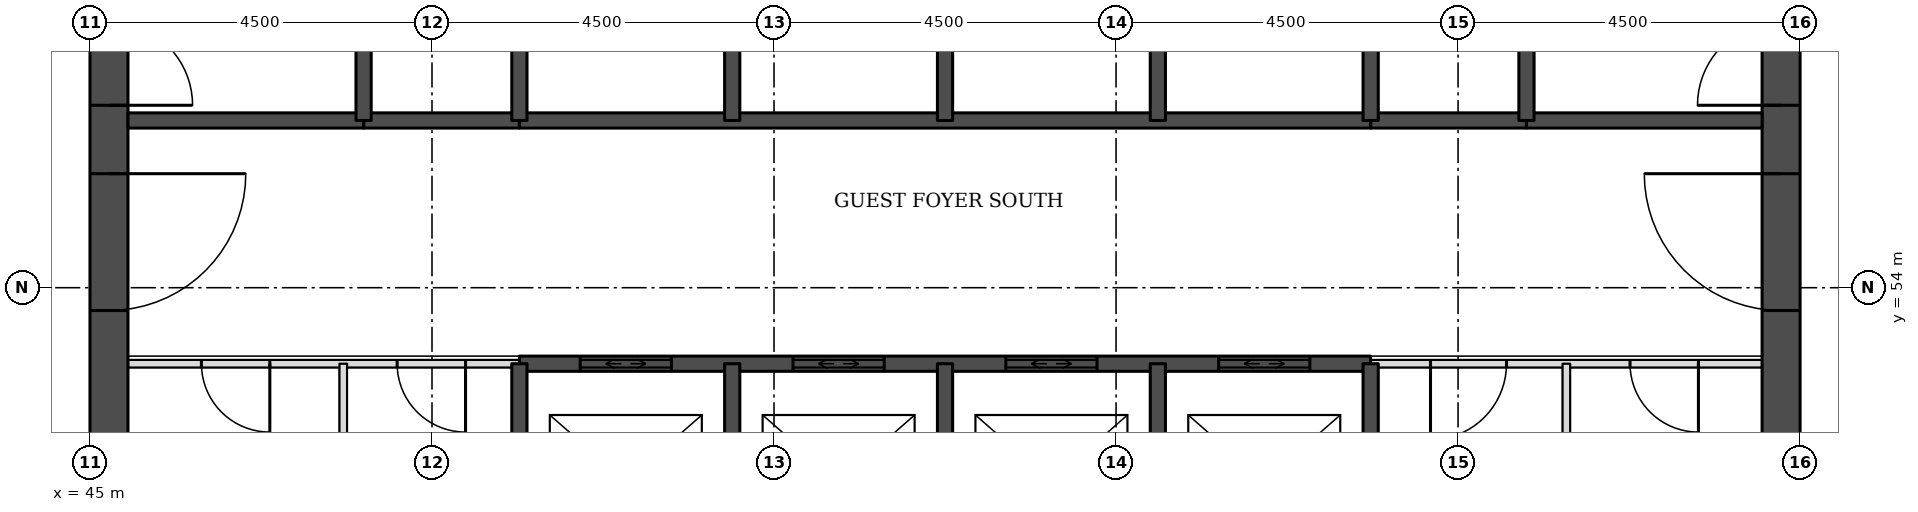
"""IFC4 building model, lengths in metres.
Left out: names, types, materials, properties, quantities, classifications, styles, units other than length and angle.
Written with IfcOpenShell. Run it as: python <this file> out.ifc"""

import sys

from ifc_helpers import new_model, si_unit, direction, frame, frame_2d, origin, place, context, subcontext, project, spatial, rectangle, extrude, element, fill, save


model = new_model("IFC4")
c1 = context("Model", 3, precision=1e-05, world=origin(), true_north=direction((0.0, 1.0)))
c2 = subcontext(c1, "Body", "Model", "MODEL_VIEW")
j1 = project(units=[si_unit("LENGTHUNIT", "METRE"), si_unit("PLANEANGLEUNIT", "RADIAN")], contexts=[c1])
p1 = place(None, origin())
s1 = spatial("IfcSite", under=j1, at=p1, CompositionType="ELEMENT")
p2 = place(p1, origin())
s2 = spatial("IfcBuilding", under=s1, at=p2, CompositionType="ELEMENT")
p3 = place(p2, frame((0.0, 0.0, 46.2)))
s3 = spatial("IfcBuildingStorey", under=s2, at=p3, CompositionType="ELEMENT", Elevation=46.2)
p4 = place(p3, frame((45.25, 49.5, 0.0), z_axis=(0.0, 0.0, 1.0), x_axis=(0.0, 1.0, 0.0)))
e1 = element("IfcWall", 1, at=p4, inside=s3, PredefinedType="SHEAR", context=c2, shape_type="SweptSolid", body=[
    extrude(rectangle(XDim=22.5, YDim=0.5, at=frame_2d((11.25, 0.0))), origin(), (0.0, 0.0, 1.0), 3.3),
])
p5 = place(p4, frame((4.2, 0.0, 0.0)))
e2 = element("IfcOpeningElement", 2, at=p5, cuts=e1, PredefinedType="OPENING", context=c2, shape_type="SweptSolid", body=[
    extrude(rectangle(XDim=1.8, YDim=2.1, at=frame_2d((0.9, 1.05))), frame((0.0, 0.26, 0.0), z_axis=(0.0, -1.0, 0.0), x_axis=(1.0, 0.0, 0.0)), (0.0, 0.0, 1.0), 0.52),
])
p6 = place(p4, frame((6.9, 0.0, 0.0)))
e3 = element("IfcOpeningElement", 3, at=p6, cuts=e1, PredefinedType="OPENING", context=c2, shape_type="SweptSolid", body=[
    extrude(rectangle(XDim=1.1, YDim=2.1, at=frame_2d((0.55, 1.05))), frame((0.0, 0.26, 0.0), z_axis=(0.0, -1.0, 0.0), x_axis=(1.0, 0.0, 0.0)), (0.0, 0.0, 1.0), 0.52),
])
p7 = place(p4, frame((13.6, 0.0, 0.0)))
e4 = element("IfcOpeningElement", 4, at=p7, cuts=e1, PredefinedType="OPENING", context=c2, shape_type="SweptSolid", body=[
    extrude(rectangle(XDim=1.1, YDim=2.1, at=frame_2d((0.55, 1.05))), frame((0.0, 0.26, 0.0), z_axis=(0.0, -1.0, 0.0), x_axis=(1.0, 0.0, 0.0)), (0.0, 0.0, 1.0), 0.52),
])
p8 = place(p4, frame((16.5, 0.0, 0.0)))
e5 = element("IfcOpeningElement", 5, at=p8, cuts=e1, PredefinedType="OPENING", context=c2, shape_type="SweptSolid", body=[
    extrude(rectangle(XDim=1.8, YDim=2.1, at=frame_2d((0.9, 1.05))), frame((0.0, 0.26, 0.0), z_axis=(0.0, -1.0, 0.0), x_axis=(1.0, 0.0, 0.0)), (0.0, 0.0, 1.0), 0.52),
])
p9 = place(p3, frame((67.25, 49.5, 0.0), z_axis=(0.0, 0.0, 1.0), x_axis=(0.0, 1.0, 0.0)))
e6 = element("IfcWall", 6, at=p9, inside=s3, PredefinedType="SHEAR", context=c2, shape_type="SweptSolid", body=[
    extrude(rectangle(XDim=22.5, YDim=0.5, at=frame_2d((11.25, 0.0))), origin(), (0.0, 0.0, 1.0), 3.3),
])
p10 = place(p9, frame((4.2, 0.0, 0.0)))
e7 = element("IfcOpeningElement", 7, at=p10, cuts=e6, PredefinedType="OPENING", context=c2, shape_type="SweptSolid", body=[
    extrude(rectangle(XDim=1.8, YDim=2.1, at=frame_2d((0.9, 1.05))), frame((0.0, 0.26, 0.0), z_axis=(0.0, -1.0, 0.0), x_axis=(1.0, 0.0, 0.0)), (0.0, 0.0, 1.0), 0.52),
])
p11 = place(p9, frame((6.9, 0.0, 0.0)))
e8 = element("IfcOpeningElement", 8, at=p11, cuts=e6, PredefinedType="OPENING", context=c2, shape_type="SweptSolid", body=[
    extrude(rectangle(XDim=1.1, YDim=2.1, at=frame_2d((0.55, 1.05))), frame((0.0, 0.26, 0.0), z_axis=(0.0, -1.0, 0.0), x_axis=(1.0, 0.0, 0.0)), (0.0, 0.0, 1.0), 0.52),
])
p12 = place(p9, frame((13.6, 0.0, 0.0)))
e9 = element("IfcOpeningElement", 9, at=p12, cuts=e6, PredefinedType="OPENING", context=c2, shape_type="SweptSolid", body=[
    extrude(rectangle(XDim=1.1, YDim=2.1, at=frame_2d((0.55, 1.05))), frame((0.0, 0.26, 0.0), z_axis=(0.0, -1.0, 0.0), x_axis=(1.0, 0.0, 0.0)), (0.0, 0.0, 1.0), 0.52),
])
p13 = place(p9, frame((16.5, 0.0, 0.0)))
e10 = element("IfcOpeningElement", 10, at=p13, cuts=e6, PredefinedType="OPENING", context=c2, shape_type="SweptSolid", body=[
    extrude(rectangle(XDim=1.8, YDim=2.1, at=frame_2d((0.9, 1.05))), frame((0.0, 0.26, 0.0), z_axis=(0.0, -1.0, 0.0), x_axis=(1.0, 0.0, 0.0)), (0.0, 0.0, 1.0), 0.52),
])
p14 = place(p3, frame((45.5, 53.0, 0.0), z_axis=(0.0, 0.0, 1.0), x_axis=(1.0, 0.0, 0.0)))
e11 = element("IfcWall", 11, at=p14, inside=s3, PredefinedType="PARTITIONING", context=c2, shape_type="SweptSolid", body=[
    extrude(rectangle(XDim=5.15, YDim=0.1, at=frame_2d((2.575, 0.0))), origin(), (0.0, 0.0, 1.0), 3.08),
])
p15 = place(p14, frame((0.966, 0.0, 0.0)))
e12 = element("IfcOpeningElement", 12, at=p15, cuts=e11, PredefinedType="OPENING", context=c2, shape_type="SweptSolid", body=[
    extrude(rectangle(XDim=0.9, YDim=2.1, at=frame_2d((0.45, 1.05))), frame((0.0, 0.06, 0.0), z_axis=(0.0, -1.0, 0.0), x_axis=(1.0, 0.0, 0.0)), (0.0, 0.0, 1.0), 0.12),
])
p16 = place(p14, frame((3.541, 0.0, 0.0)))
e13 = element("IfcOpeningElement", 13, at=p16, cuts=e11, PredefinedType="OPENING", context=c2, shape_type="SweptSolid", body=[
    extrude(rectangle(XDim=0.9, YDim=2.1, at=frame_2d((0.45, 1.05))), frame((0.0, 0.06, 0.0), z_axis=(0.0, -1.0, 0.0), x_axis=(1.0, 0.0, 0.0)), (0.0, 0.0, 1.0), 0.12),
])
p17 = place(p3, frame((61.85, 53.0, 0.0), z_axis=(0.0, 0.0, 1.0), x_axis=(1.0, 0.0, 0.0)))
e14 = element("IfcWall", 14, at=p17, inside=s3, PredefinedType="PARTITIONING", context=c2, shape_type="SweptSolid", body=[
    extrude(rectangle(XDim=5.15, YDim=0.1, at=frame_2d((2.575, 0.0))), origin(), (0.0, 0.0, 1.0), 3.08),
])
p18 = place(p17, frame((3.413, 0.0, 0.0)))
e15 = element("IfcOpeningElement", 15, at=p18, cuts=e14, PredefinedType="OPENING", context=c2, shape_type="SweptSolid", body=[
    extrude(rectangle(XDim=0.9, YDim=2.1, at=frame_2d((0.45, 1.05))), frame((0.0, 0.06, 0.0), z_axis=(0.0, -1.0, 0.0), x_axis=(1.0, 0.0, 0.0)), (0.0, 0.0, 1.0), 0.12),
])
p19 = place(p17, frame((0.788, 0.0, 0.0)))
e16 = element("IfcOpeningElement", 16, at=p19, cuts=e14, PredefinedType="OPENING", context=c2, shape_type="SweptSolid", body=[
    extrude(rectangle(XDim=1.0, YDim=2.1, at=frame_2d((0.5, 1.05))), frame((0.0, 0.06, 0.0), z_axis=(0.0, -1.0, 0.0), x_axis=(1.0, 0.0, 0.0)), (0.0, 0.0, 1.0), 0.12),
])
p20 = place(p3, frame((50.65, 53.0, 0.0), z_axis=(0.0, 0.0, 1.0), x_axis=(1.0, 0.0, 0.0)))
e17 = element("IfcWall", 17, at=p20, inside=s3, PredefinedType="SOLIDWALL", context=c2, shape_type="SweptSolid", body=[
    extrude(rectangle(XDim=11.2, YDim=0.2, at=frame_2d((5.6, 0.0))), origin(), (0.0, 0.0, 1.0), 3.08),
])
p21 = place(p20, frame((0.8, 0.0, 0.0)))
e18 = element("IfcOpeningElement", 18, at=p21, cuts=e17, PredefinedType="OPENING", context=c2, shape_type="SweptSolid", body=[
    extrude(rectangle(XDim=1.2, YDim=2.1, at=frame_2d((0.6, 1.05))), frame((0.0, 0.11, 0.0), z_axis=(0.0, -1.0, 0.0), x_axis=(1.0, 0.0, 0.0)), (0.0, 0.0, 1.0), 0.22),
])
p22 = place(p20, frame((3.6, 0.0, 0.0)))
e19 = element("IfcOpeningElement", 19, at=p22, cuts=e17, PredefinedType="OPENING", context=c2, shape_type="SweptSolid", body=[
    extrude(rectangle(XDim=1.2, YDim=2.1, at=frame_2d((0.6, 1.05))), frame((0.0, 0.11, 0.0), z_axis=(0.0, -1.0, 0.0), x_axis=(1.0, 0.0, 0.0)), (0.0, 0.0, 1.0), 0.22),
])
p23 = place(p20, frame((6.4, 0.0, 0.0)))
e20 = element("IfcOpeningElement", 20, at=p23, cuts=e17, PredefinedType="OPENING", context=c2, shape_type="SweptSolid", body=[
    extrude(rectangle(XDim=1.2, YDim=2.1, at=frame_2d((0.6, 1.05))), frame((0.0, 0.11, 0.0), z_axis=(0.0, -1.0, 0.0), x_axis=(1.0, 0.0, 0.0)), (0.0, 0.0, 1.0), 0.22),
])
p24 = place(p20, frame((9.2, 0.0, 0.0)))
e21 = element("IfcOpeningElement", 21, at=p24, cuts=e17, PredefinedType="OPENING", context=c2, shape_type="SweptSolid", body=[
    extrude(rectangle(XDim=1.2, YDim=2.1, at=frame_2d((0.6, 1.05))), frame((0.0, 0.11, 0.0), z_axis=(0.0, -1.0, 0.0), x_axis=(1.0, 0.0, 0.0)), (0.0, 0.0, 1.0), 0.22),
])
for number, where, z_axis, x_axis in (
    (22, (48.6, 56.2, 0.0), (0.0, 0.0, 1.0), (1.0, 0.0, 0.0)),
    (23, (61.85, 56.2, 0.0), (0.0, 0.0, 1.0), (1.0, 0.0, 0.0)),
):
    element("IfcWall", number, at=place(p3, frame(where, z_axis=z_axis, x_axis=x_axis)), inside=s3, PredefinedType="SOLIDWALL", context=c2, shape_type="SweptSolid", body=[
        extrude(rectangle(XDim=2.05, YDim=0.2, at=frame_2d((1.025, 0.0))), origin(), (0.0, 0.0, 1.0), 3.08),
    ])
p25 = place(p3, frame((45.5, 56.2, 0.0), z_axis=(0.0, 0.0, 1.0), x_axis=(1.0, 0.0, 0.0)))
e24 = element("IfcWall", 24, at=p25, inside=s3, PredefinedType="SOLIDWALL", context=c2, shape_type="SweptSolid", body=[
    extrude(rectangle(XDim=3.1, YDim=0.2, at=frame_2d((1.55, 0.0))), origin(), (0.0, 0.0, 1.0), 3.08),
])
p26 = place(p3, frame((50.65, 56.2, 0.0), z_axis=(0.0, 0.0, 1.0), x_axis=(1.0, 0.0, 0.0)))
e25 = element("IfcWall", 25, at=p26, inside=s3, PredefinedType="SOLIDWALL", context=c2, shape_type="SweptSolid", body=[
    extrude(rectangle(XDim=11.2, YDim=0.2, at=frame_2d((5.6, 0.0))), origin(), (0.0, 0.0, 1.0), 3.08),
])
p27 = place(p3, frame((63.9, 56.2, 0.0), z_axis=(0.0, 0.0, 1.0), x_axis=(1.0, 0.0, 0.0)))
e26 = element("IfcWall", 26, at=p27, inside=s3, PredefinedType="SOLIDWALL", context=c2, shape_type="SweptSolid", body=[
    extrude(rectangle(XDim=3.1, YDim=0.2, at=frame_2d((1.55, 0.0))), origin(), (0.0, 0.0, 1.0), 3.08),
])
p28 = place(p3, frame((48.333, 50.0, 0.0), z_axis=(0.0, 0.0, 1.0), x_axis=(0.0, 1.0, 0.0)))
e27 = element("IfcWall", 27, at=p28, inside=s3, PredefinedType="PARTITIONING", context=c2, shape_type="SweptSolid", body=[
    extrude(rectangle(XDim=3.0, YDim=0.1, at=frame_2d((1.5, 0.0))), origin(), (0.0, 0.0, 1.0), 3.08),
])
p29 = place(p3, frame((48.6, 56.2, 0.0), z_axis=(0.0, 0.0, 1.0), x_axis=(0.0, 1.0, 0.0)))
e28 = element("IfcWall", 28, at=p29, inside=s3, PredefinedType="SOLIDWALL", context=c2, shape_type="SweptSolid", body=[
    extrude(rectangle(XDim=5.8, YDim=0.2, at=frame_2d((2.9, 0.0))), origin(), (0.0, 0.0, 1.0), 3.08),
])
p30 = place(p3, frame((50.65, 50.0, 0.0), z_axis=(0.0, 0.0, 1.0), x_axis=(0.0, 1.0, 0.0)))
e29 = element("IfcWall", 29, at=p30, inside=s3, PredefinedType="SOLIDWALL", context=c2, shape_type="SweptSolid", body=[
    extrude(rectangle(XDim=3.0, YDim=0.2, at=frame_2d((1.5, 0.0))), origin(), (0.0, 0.0, 1.0), 3.08),
])
p31 = place(p3, frame((50.65, 56.2, 0.0), z_axis=(0.0, 0.0, 1.0), x_axis=(0.0, 1.0, 0.0)))
e30 = element("IfcWall", 30, at=p31, inside=s3, PredefinedType="SOLIDWALL", context=c2, shape_type="SweptSolid", body=[
    extrude(rectangle(XDim=2.8, YDim=0.2, at=frame_2d((1.4, 0.0))), origin(), (0.0, 0.0, 1.0), 3.08),
])
p32 = place(p3, frame((53.45, 50.0, 0.0), z_axis=(0.0, 0.0, 1.0), x_axis=(0.0, 1.0, 0.0)))
e31 = element("IfcWall", 31, at=p32, inside=s3, PredefinedType="SOLIDWALL", context=c2, shape_type="SweptSolid", body=[
    extrude(rectangle(XDim=3.0, YDim=0.2, at=frame_2d((1.5, 0.0))), origin(), (0.0, 0.0, 1.0), 3.08),
])
p33 = place(p3, frame((53.45, 56.2, 0.0), z_axis=(0.0, 0.0, 1.0), x_axis=(0.0, 1.0, 0.0)))
e32 = element("IfcWall", 32, at=p33, inside=s3, PredefinedType="SOLIDWALL", context=c2, shape_type="SweptSolid", body=[
    extrude(rectangle(XDim=2.8, YDim=0.2, at=frame_2d((1.4, 0.0))), origin(), (0.0, 0.0, 1.0), 3.08),
])
p34 = place(p3, frame((56.25, 50.0, 0.0), z_axis=(0.0, 0.0, 1.0), x_axis=(0.0, 1.0, 0.0)))
e33 = element("IfcWall", 33, at=p34, inside=s3, PredefinedType="SOLIDWALL", context=c2, shape_type="SweptSolid", body=[
    extrude(rectangle(XDim=3.0, YDim=0.2, at=frame_2d((1.5, 0.0))), origin(), (0.0, 0.0, 1.0), 3.08),
])
p35 = place(p3, frame((56.25, 56.2, 0.0), z_axis=(0.0, 0.0, 1.0), x_axis=(0.0, 1.0, 0.0)))
e34 = element("IfcWall", 34, at=p35, inside=s3, PredefinedType="SOLIDWALL", context=c2, shape_type="SweptSolid", body=[
    extrude(rectangle(XDim=2.8, YDim=0.2, at=frame_2d((1.4, 0.0))), origin(), (0.0, 0.0, 1.0), 3.08),
])
p36 = place(p3, frame((59.05, 50.0, 0.0), z_axis=(0.0, 0.0, 1.0), x_axis=(0.0, 1.0, 0.0)))
e35 = element("IfcWall", 35, at=p36, inside=s3, PredefinedType="SOLIDWALL", context=c2, shape_type="SweptSolid", body=[
    extrude(rectangle(XDim=3.0, YDim=0.2, at=frame_2d((1.5, 0.0))), origin(), (0.0, 0.0, 1.0), 3.08),
])
p37 = place(p3, frame((59.05, 56.2, 0.0), z_axis=(0.0, 0.0, 1.0), x_axis=(0.0, 1.0, 0.0)))
e36 = element("IfcWall", 36, at=p37, inside=s3, PredefinedType="SOLIDWALL", context=c2, shape_type="SweptSolid", body=[
    extrude(rectangle(XDim=2.8, YDim=0.2, at=frame_2d((1.4, 0.0))), origin(), (0.0, 0.0, 1.0), 3.08),
])
p38 = place(p3, frame((61.85, 50.0, 0.0), z_axis=(0.0, 0.0, 1.0), x_axis=(0.0, 1.0, 0.0)))
e37 = element("IfcWall", 37, at=p38, inside=s3, PredefinedType="SOLIDWALL", context=c2, shape_type="SweptSolid", body=[
    extrude(rectangle(XDim=3.0, YDim=0.2, at=frame_2d((1.5, 0.0))), origin(), (0.0, 0.0, 1.0), 3.08),
])
p39 = place(p3, frame((61.85, 56.2, 0.0), z_axis=(0.0, 0.0, 1.0), x_axis=(0.0, 1.0, 0.0)))
e38 = element("IfcWall", 38, at=p39, inside=s3, PredefinedType="SOLIDWALL", context=c2, shape_type="SweptSolid", body=[
    extrude(rectangle(XDim=2.8, YDim=0.2, at=frame_2d((1.4, 0.0))), origin(), (0.0, 0.0, 1.0), 3.08),
])
p40 = place(p3, frame((63.9, 56.2, 0.0), z_axis=(0.0, 0.0, 1.0), x_axis=(0.0, 1.0, 0.0)))
e39 = element("IfcWall", 39, at=p40, inside=s3, PredefinedType="SOLIDWALL", context=c2, shape_type="SweptSolid", body=[
    extrude(rectangle(XDim=5.8, YDim=0.2, at=frame_2d((2.9, 0.0))), origin(), (0.0, 0.0, 1.0), 3.08),
])
p41 = place(p3, frame((64.425, 50.0, 0.0), z_axis=(0.0, 0.0, 1.0), x_axis=(0.0, 1.0, 0.0)))
e40 = element("IfcWall", 40, at=p41, inside=s3, PredefinedType="PARTITIONING", context=c2, shape_type="SweptSolid", body=[
    extrude(rectangle(XDim=3.0, YDim=0.1, at=frame_2d((1.5, 0.0))), origin(), (0.0, 0.0, 1.0), 3.08),
])
p42 = place(p21, origin())
e41 = element("IfcDoor", 41, at=p42, inside=s3, OperationType="DOUBLE_DOOR_SLIDING", PredefinedType="DOOR", context=c2, shape_type="SweptSolid", body=[
    extrude(rectangle(XDim=1.2, YDim=2.1, at=frame_2d((0.6, 1.05))), frame((0.0, 0.025, 0.0), z_axis=(0.0, -1.0, 0.0), x_axis=(1.0, 0.0, 0.0)), (0.0, 0.0, 1.0), 0.05),
])
fill(e18, e41)
p43 = place(p22, origin())
e42 = element("IfcDoor", 42, at=p43, inside=s3, OperationType="DOUBLE_DOOR_SLIDING", PredefinedType="DOOR", context=c2, shape_type="SweptSolid", body=[
    extrude(rectangle(XDim=1.2, YDim=2.1, at=frame_2d((0.6, 1.05))), frame((0.0, 0.025, 0.0), z_axis=(0.0, -1.0, 0.0), x_axis=(1.0, 0.0, 0.0)), (0.0, 0.0, 1.0), 0.05),
])
fill(e19, e42)
p44 = place(p23, origin())
e43 = element("IfcDoor", 43, at=p44, inside=s3, OperationType="DOUBLE_DOOR_SLIDING", PredefinedType="DOOR", context=c2, shape_type="SweptSolid", body=[
    extrude(rectangle(XDim=1.2, YDim=2.1, at=frame_2d((0.6, 1.05))), frame((0.0, 0.025, 0.0), z_axis=(0.0, -1.0, 0.0), x_axis=(1.0, 0.0, 0.0)), (0.0, 0.0, 1.0), 0.05),
])
fill(e20, e43)
p45 = place(p24, origin())
e44 = element("IfcDoor", 44, at=p45, inside=s3, OperationType="DOUBLE_DOOR_SLIDING", PredefinedType="DOOR", context=c2, shape_type="SweptSolid", body=[
    extrude(rectangle(XDim=1.2, YDim=2.1, at=frame_2d((0.6, 1.05))), frame((0.0, 0.025, 0.0), z_axis=(0.0, -1.0, 0.0), x_axis=(1.0, 0.0, 0.0)), (0.0, 0.0, 1.0), 0.05),
])
fill(e21, e44)
p46 = place(p5, frame((1.8, 0.0, 0.0), z_axis=(0.0, 0.0, 1.0), x_axis=(-1.0, 0.0, 0.0)))
e45 = element("IfcDoor", 45, at=p46, inside=s3, OperationType="SINGLE_SWING_LEFT", PredefinedType="DOOR", context=c2, shape_type="SweptSolid", body=[
    extrude(rectangle(XDim=1.8, YDim=2.1, at=frame_2d((0.9, 1.05))), frame((0.0, 0.025, 0.0), z_axis=(0.0, -1.0, 0.0), x_axis=(1.0, 0.0, 0.0)), (0.0, 0.0, 1.0), 0.05),
])
fill(e2, e45)
p47 = place(p6, frame((1.1, 0.0, 0.0), z_axis=(0.0, 0.0, 1.0), x_axis=(-1.0, 0.0, 0.0)))
e46 = element("IfcDoor", 46, at=p47, inside=s3, OperationType="SINGLE_SWING_RIGHT", PredefinedType="DOOR", context=c2, shape_type="SweptSolid", body=[
    extrude(rectangle(XDim=1.1, YDim=2.1, at=frame_2d((0.55, 1.05))), frame((0.0, 0.025, 0.0), z_axis=(0.0, -1.0, 0.0), x_axis=(1.0, 0.0, 0.0)), (0.0, 0.0, 1.0), 0.05),
])
fill(e3, e46)
p48 = place(p10, origin())
e47 = element("IfcDoor", 47, at=p48, inside=s3, OperationType="SINGLE_SWING_RIGHT", PredefinedType="DOOR", context=c2, shape_type="SweptSolid", body=[
    extrude(rectangle(XDim=1.8, YDim=2.1, at=frame_2d((0.9, 1.05))), frame((0.0, 0.025, 0.0), z_axis=(0.0, -1.0, 0.0), x_axis=(1.0, 0.0, 0.0)), (0.0, 0.0, 1.0), 0.05),
])
fill(e7, e47)
p49 = place(p11, origin())
e48 = element("IfcDoor", 48, at=p49, inside=s3, OperationType="SINGLE_SWING_LEFT", PredefinedType="DOOR", context=c2, shape_type="SweptSolid", body=[
    extrude(rectangle(XDim=1.1, YDim=2.1, at=frame_2d((0.55, 1.05))), frame((0.0, 0.025, 0.0), z_axis=(0.0, -1.0, 0.0), x_axis=(1.0, 0.0, 0.0)), (0.0, 0.0, 1.0), 0.05),
])
fill(e8, e48)
p50 = place(p18, frame((0.9, 0.0, 0.0), z_axis=(0.0, 0.0, 1.0), x_axis=(-1.0, 0.0, 0.0)))
e49 = element("IfcDoor", 49, at=p50, inside=s3, OperationType="SINGLE_SWING_LEFT", PredefinedType="DOOR", context=c2, shape_type="SweptSolid", body=[
    extrude(rectangle(XDim=0.9, YDim=2.1, at=frame_2d((0.45, 1.05))), frame((0.0, 0.025, 0.0), z_axis=(0.0, -1.0, 0.0), x_axis=(1.0, 0.0, 0.0)), (0.0, 0.0, 1.0), 0.05),
])
fill(e15, e49)
p51 = place(p19, frame((1.0, 0.0, 0.0), z_axis=(0.0, 0.0, 1.0), x_axis=(-1.0, 0.0, 0.0)))
e50 = element("IfcDoor", 50, at=p51, inside=s3, OperationType="SINGLE_SWING_RIGHT", PredefinedType="DOOR", context=c2, shape_type="SweptSolid", body=[
    extrude(rectangle(XDim=1.0, YDim=2.1, at=frame_2d((0.5, 1.05))), frame((0.0, 0.025, 0.0), z_axis=(0.0, -1.0, 0.0), x_axis=(1.0, 0.0, 0.0)), (0.0, 0.0, 1.0), 0.05),
])
fill(e16, e50)
p52 = place(p15, frame((0.9, 0.0, 0.0), z_axis=(0.0, 0.0, 1.0), x_axis=(-1.0, 0.0, 0.0)))
e51 = element("IfcDoor", 51, at=p52, inside=s3, OperationType="SINGLE_SWING_LEFT", PredefinedType="DOOR", context=c2, shape_type="SweptSolid", body=[
    extrude(rectangle(XDim=0.9, YDim=2.1, at=frame_2d((0.45, 1.05))), frame((0.0, 0.025, 0.0), z_axis=(0.0, -1.0, 0.0), x_axis=(1.0, 0.0, 0.0)), (0.0, 0.0, 1.0), 0.05),
])
fill(e12, e51)
p53 = place(p16, frame((0.9, 0.0, 0.0), z_axis=(0.0, 0.0, 1.0), x_axis=(-1.0, 0.0, 0.0)))
e52 = element("IfcDoor", 52, at=p53, inside=s3, OperationType="SINGLE_SWING_LEFT", PredefinedType="DOOR", context=c2, shape_type="SweptSolid", body=[
    extrude(rectangle(XDim=0.9, YDim=2.1, at=frame_2d((0.45, 1.05))), frame((0.0, 0.025, 0.0), z_axis=(0.0, -1.0, 0.0), x_axis=(1.0, 0.0, 0.0)), (0.0, 0.0, 1.0), 0.05),
])
fill(e13, e52)
save(model, sys.argv[1])
